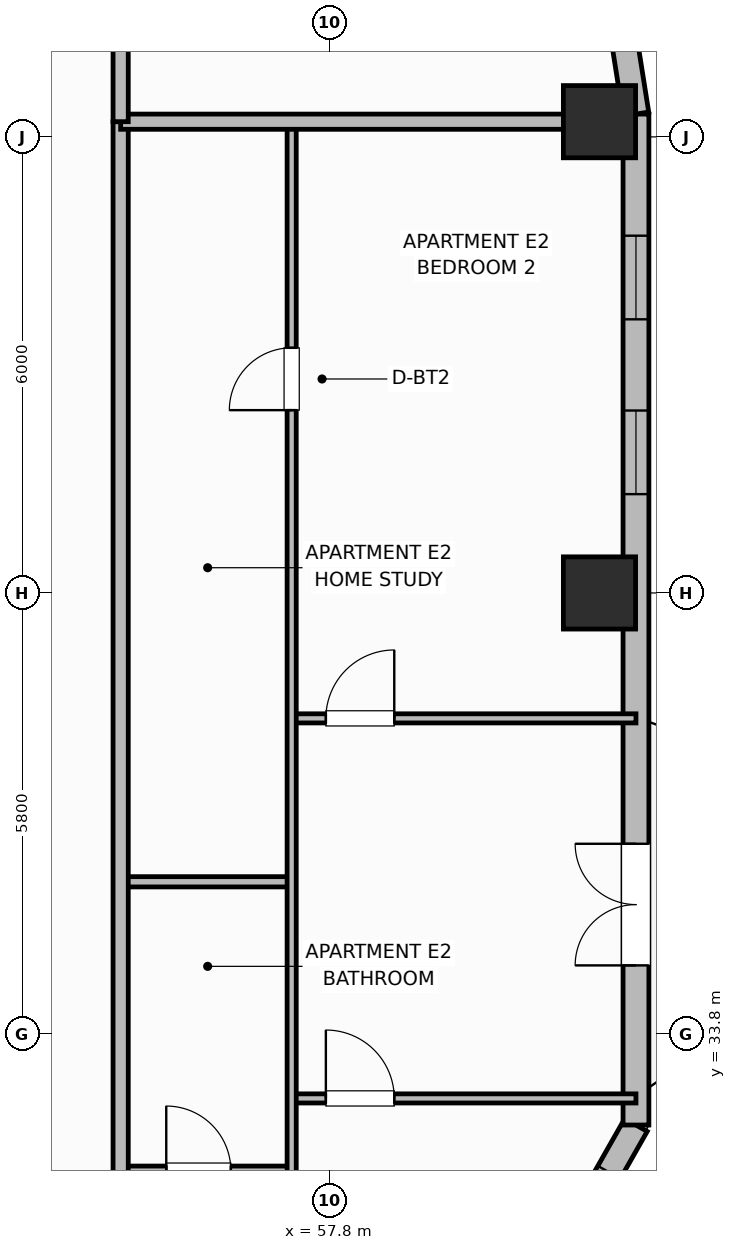
"""IFC4 building model, lengths in metres.
Left out: names, types, materials, properties, quantities, classifications, styles, units other than length and angle.
Written with IfcOpenShell. Run it as: python <this file> out.ifc"""

import sys

from ifc_helpers import new_model, si_unit, direction, frame, frame_2d, origin, origin_2d, place, context, subcontext, project, spatial, rectangle, extrude, element, fill, save


model = new_model("IFC4")
c1 = context("Model", 3, precision=1e-05, world=origin(), true_north=direction((0.0, 1.0)))
c2 = subcontext(c1, "Body", "Model", "MODEL_VIEW")
j1 = project(units=[si_unit("LENGTHUNIT", "METRE"), si_unit("PLANEANGLEUNIT", "RADIAN")], contexts=[c1])
p1 = place(None, origin())
s1 = spatial("IfcSite", under=j1, at=p1, CompositionType="ELEMENT")
p2 = place(p1, origin())
s2 = spatial("IfcBuilding", under=s1, at=p2, CompositionType="ELEMENT")
p3 = place(p2, frame((0.0, 0.0, 166.3)))
s3 = spatial("IfcBuildingStorey", under=s2, at=p3, CompositionType="ELEMENT", Elevation=166.3)
for number, where, z_axis, x_axis in (
    (1, (61.35, 39.6, 0.0), (0.0, 0.0, 1.0), (1.0, 0.0, 0.0)),
    (2, (61.35, 45.8, 0.0), (0.0, 0.0, 1.0), (1.0, 0.0, 0.0)),
):
    element("IfcColumn", number, at=place(p3, frame(where, z_axis=z_axis, x_axis=x_axis)), inside=s3, PredefinedType="COLUMN", context=c2, shape_type="SweptSolid", body=[
        extrude(rectangle(XDim=0.95, YDim=0.95, at=origin_2d()), origin(), (0.0, 0.0, 1.0), 3.7),
    ])
p4 = place(p3, frame((60.58, 30.4, 0.0), z_axis=(0.0, 0.0, 1.0), x_axis=(0.493976255291, 0.869475393101, 0.0)))
e3 = element("IfcWall", 3, at=p4, inside=s3, PredefinedType="SOLIDWALL", context=c2, shape_type="SweptSolid", body=[
    extrude(rectangle(XDim=2.531, YDim=0.34, at=frame_2d((1.265, 0.0))), origin(), (0.0, 0.0, 1.0), 2.72),
])
p5 = place(p4, frame((0.715, 0.0, 0.91)))
e4 = element("IfcOpeningElement", 4, at=p5, cuts=e3, PredefinedType="OPENING", context=c2, shape_type="SweptSolid", body=[
    extrude(rectangle(XDim=1.1, YDim=1.65, at=frame_2d((0.55, 0.825))), frame((0.0, 0.18, 0.0), z_axis=(0.0, -1.0, 0.0), x_axis=(1.0, 0.0, 0.0)), (0.0, 0.0, 1.0), 0.36),
])
p6 = place(p3, frame((61.83, 32.6, 0.0), z_axis=(0.0, 0.0, 1.0), x_axis=(0.0, 1.0, 0.0)))
e5 = element("IfcWall", 5, at=p6, inside=s3, PredefinedType="SOLIDWALL", context=c2, shape_type="SweptSolid", body=[
    extrude(rectangle(XDim=13.3, YDim=0.34, at=frame_2d((6.65, 0.0))), origin(), (0.0, 0.0, 1.0), 2.72),
])
p7 = place(p6, frame((2.1, 0.0, 0.0)))
e6 = element("IfcOpeningElement", 6, at=p7, cuts=e5, PredefinedType="OPENING", context=c2, shape_type="SweptSolid", body=[
    extrude(rectangle(XDim=1.6, YDim=2.1, at=frame_2d((0.8, 1.05))), frame((0.0, 0.18, 0.0), z_axis=(0.0, -1.0, 0.0), x_axis=(1.0, 0.0, 0.0)), (0.0, 0.0, 1.0), 0.36),
])
p8 = place(p6, frame((8.3, 0.0, 0.95)))
e7 = element("IfcOpeningElement", 7, at=p8, cuts=e5, PredefinedType="OPENING", context=c2, shape_type="SweptSolid", body=[
    extrude(rectangle(XDim=1.1, YDim=1.65, at=frame_2d((0.55, 0.825))), frame((0.0, 0.18, 0.0), z_axis=(0.0, -1.0, 0.0), x_axis=(1.0, 0.0, 0.0)), (0.0, 0.0, 1.0), 0.36),
])
p9 = place(p6, frame((10.6, 0.0, 0.95)))
e8 = element("IfcOpeningElement", 8, at=p9, cuts=e5, PredefinedType="OPENING", context=c2, shape_type="SweptSolid", body=[
    extrude(rectangle(XDim=1.1, YDim=1.65, at=frame_2d((0.55, 0.825))), frame((0.0, 0.18, 0.0), z_axis=(0.0, -1.0, 0.0), x_axis=(1.0, 0.0, 0.0)), (0.0, 0.0, 1.0), 0.36),
])
p10 = place(p3, frame((61.83, 45.9, 0.0), z_axis=(0.0, 0.0, 1.0), x_axis=(-0.156481329164, 0.987680916907, 0.0)))
e9 = element("IfcWall", 9, at=p10, inside=s3, PredefinedType="SOLIDWALL", context=c2, shape_type="SweptSolid", body=[
    extrude(rectangle(XDim=1.136, YDim=0.34, at=frame_2d((0.568, 0.0))), origin(), (0.0, 0.0, 1.0), 2.72),
])
p11 = place(p3, frame((55.05, 32.0, 0.0), z_axis=(0.0, 0.0, 1.0), x_axis=(1.0, 0.0, 0.0)))
e10 = element("IfcWall", 10, at=p11, inside=s3, PredefinedType="PARTITIONING", context=c2, shape_type="SweptSolid", body=[
    extrude(rectangle(XDim=2.25, YDim=0.12, at=frame_2d((1.125, 0.0))), origin(), (0.0, 0.0, 1.0), 2.55),
])
p12 = place(p11, frame((0.6, 0.0, 0.0)))
e11 = element("IfcOpeningElement", 11, at=p12, cuts=e10, PredefinedType="OPENING", context=c2, shape_type="SweptSolid", body=[
    extrude(rectangle(XDim=0.85, YDim=2.1, at=frame_2d((0.425, 1.05))), frame((0.0, 0.07, 0.0), z_axis=(0.0, -1.0, 0.0), x_axis=(1.0, 0.0, 0.0)), (0.0, 0.0, 1.0), 0.14),
])
p13 = place(p3, frame((55.05, 35.8, 0.0), z_axis=(0.0, 0.0, 1.0), x_axis=(1.0, 0.0, 0.0)))
e12 = element("IfcWall", 12, at=p13, inside=s3, PredefinedType="PARTITIONING", context=c2, shape_type="SweptSolid", body=[
    extrude(rectangle(XDim=2.25, YDim=0.135, at=frame_2d((1.125, 0.0))), origin(), (0.0, 0.0, 1.0), 2.55),
])
p14 = place(p3, frame((57.3, 32.95, 0.0), z_axis=(0.0, 0.0, 1.0), x_axis=(1.0, 0.0, 0.0)))
e13 = element("IfcWall", 13, at=p14, inside=s3, PredefinedType="PARTITIONING", context=c2, shape_type="SweptSolid", body=[
    extrude(rectangle(XDim=4.53, YDim=0.12, at=frame_2d((2.265, 0.0))), origin(), (0.0, 0.0, 1.0), 2.55),
])
p15 = place(p14, frame((0.45, 0.0, 0.0)))
e14 = element("IfcOpeningElement", 14, at=p15, cuts=e13, PredefinedType="OPENING", context=c2, shape_type="SweptSolid", body=[
    extrude(rectangle(XDim=0.9, YDim=2.1, at=frame_2d((0.45, 1.05))), frame((0.0, 0.07, 0.0), z_axis=(0.0, -1.0, 0.0), x_axis=(1.0, 0.0, 0.0)), (0.0, 0.0, 1.0), 0.14),
])
p16 = place(p3, frame((57.3, 37.95, 0.0), z_axis=(0.0, 0.0, 1.0), x_axis=(1.0, 0.0, 0.0)))
e15 = element("IfcWall", 15, at=p16, inside=s3, PredefinedType="PARTITIONING", context=c2, shape_type="SweptSolid", body=[
    extrude(rectangle(XDim=4.53, YDim=0.12, at=frame_2d((2.265, 0.0))), origin(), (0.0, 0.0, 1.0), 2.55),
])
p17 = place(p16, frame((0.45, 0.0, 0.0)))
e16 = element("IfcOpeningElement", 16, at=p17, cuts=e15, PredefinedType="OPENING", context=c2, shape_type="SweptSolid", body=[
    extrude(rectangle(XDim=0.9, YDim=2.1, at=frame_2d((0.45, 1.05))), frame((0.0, 0.07, 0.0), z_axis=(0.0, -1.0, 0.0), x_axis=(1.0, 0.0, 0.0)), (0.0, 0.0, 1.0), 0.14),
])
p18 = place(p3, frame((57.3, 26.64, 0.0), z_axis=(0.0, 0.0, 1.0), x_axis=(0.0, 1.0, 0.0)))
e17 = element("IfcWall", 17, at=p18, inside=s3, PredefinedType="PARTITIONING", context=c2, shape_type="SweptSolid", body=[
    extrude(rectangle(XDim=19.12, YDim=0.12, at=frame_2d((9.56, 0.0))), origin(), (0.0, 0.0, 1.0), 2.55),
])
p19 = place(p18, frame((2.81, 0.0, 0.0)))
e18 = element("IfcOpeningElement", 18, at=p19, cuts=e17, PredefinedType="OPENING", context=c2, shape_type="SweptSolid", body=[
    extrude(rectangle(XDim=0.9, YDim=2.1, at=frame_2d((0.45, 1.05))), frame((0.0, 0.07, 0.0), z_axis=(0.0, -1.0, 0.0), x_axis=(1.0, 0.0, 0.0)), (0.0, 0.0, 1.0), 0.14),
])
p20 = place(p18, frame((15.365, 0.0, 0.0)))
e19 = element("IfcOpeningElement", 19, at=p20, cuts=e17, PredefinedType="OPENING", context=c2, shape_type="SweptSolid", body=[
    extrude(rectangle(XDim=0.82, YDim=2.08, at=frame_2d((0.41, 1.04))), frame((0.0, 0.07, 0.0), z_axis=(0.0, -1.0, 0.0), x_axis=(1.0, 0.0, 0.0)), (0.0, 0.0, 1.0), 0.14),
])
p21 = place(p3, frame((55.05, 10.6, 0.0), z_axis=(0.0, 0.0, 1.0), x_axis=(0.0, 1.0, 0.0)))
e20 = element("IfcWall", 20, at=p21, inside=s3, PredefinedType="PARTITIONING", context=c2, shape_type="SweptSolid", body=[
    extrude(rectangle(XDim=35.2, YDim=0.2, at=frame_2d((17.6, 0.0))), origin(), (0.0, 0.0, 1.0), 2.55),
])
p22 = place(p21, frame((2.65, 0.0, 0.0)))
e21 = element("IfcOpeningElement", 21, at=p22, cuts=e20, PredefinedType="OPENING", context=c2, shape_type="SweptSolid", body=[
    extrude(rectangle(XDim=1.0, YDim=2.15, at=frame_2d((0.5, 1.075))), frame((0.0, 0.11, 0.0), z_axis=(0.0, -1.0, 0.0), x_axis=(1.0, 0.0, 0.0)), (0.0, 0.0, 1.0), 0.22),
])
p23 = place(p21, frame((19.95, 0.0, 0.0)))
e22 = element("IfcOpeningElement", 22, at=p23, cuts=e20, PredefinedType="OPENING", context=c2, shape_type="SweptSolid", body=[
    extrude(rectangle(XDim=1.0, YDim=2.15, at=frame_2d((0.5, 1.075))), frame((0.0, 0.11, 0.0), z_axis=(0.0, -1.0, 0.0), x_axis=(1.0, 0.0, 0.0)), (0.0, 0.0, 1.0), 0.22),
])
p24 = place(p3, frame((55.05, 45.8, 0.0), z_axis=(0.0, 0.0, 1.0), x_axis=(1.0, 0.0, 0.0)))
e23 = element("IfcWall", 23, at=p24, inside=s3, PredefinedType="PARTITIONING", context=c2, shape_type="SweptSolid", body=[
    extrude(rectangle(XDim=6.36, YDim=0.2, at=frame_2d((3.18, 0.0))), origin(), (0.0, 0.0, 1.0), 2.55),
])
p25 = place(p3, frame((55.05, 45.8, 0.0), z_axis=(0.0, 0.0, 1.0), x_axis=(0.0, 1.0, 0.0)))
e24 = element("IfcWall", 24, at=p25, inside=s3, PredefinedType="PARTITIONING", context=c2, shape_type="SweptSolid", body=[
    extrude(rectangle(XDim=3.73, YDim=0.2, at=frame_2d((1.865, 0.0))), origin(), (0.0, 0.0, 1.0), 2.55),
])
p26 = place(p7, origin())
e25 = element("IfcDoor", 25, at=p26, inside=s3, OperationType="DOUBLE_DOOR_SINGLE_SWING", PredefinedType="DOOR", context=c2, shape_type="SweptSolid", body=[
    extrude(rectangle(XDim=1.6, YDim=2.1, at=frame_2d((0.8, 1.05))), frame((0.0, 0.025, 0.0), z_axis=(0.0, -1.0, 0.0), x_axis=(1.0, 0.0, 0.0)), (0.0, 0.0, 1.0), 0.05),
])
fill(e6, e25)
p27 = place(p8, origin())
e26 = element("IfcWindow", 26, at=p27, inside=s3, PartitioningType="SINGLE_PANEL", PredefinedType="WINDOW", context=c2, shape_type="SweptSolid", body=[
    extrude(rectangle(XDim=1.1, YDim=1.65, at=frame_2d((0.55, 0.825))), frame((0.0, 0.03, 0.0), z_axis=(0.0, -1.0, 0.0), x_axis=(1.0, 0.0, 0.0)), (0.0, 0.0, 1.0), 0.06),
])
fill(e7, e26)
p28 = place(p9, origin())
e27 = element("IfcWindow", 27, at=p28, inside=s3, PartitioningType="SINGLE_PANEL", PredefinedType="WINDOW", context=c2, shape_type="SweptSolid", body=[
    extrude(rectangle(XDim=1.1, YDim=1.65, at=frame_2d((0.55, 0.825))), frame((0.0, 0.03, 0.0), z_axis=(0.0, -1.0, 0.0), x_axis=(1.0, 0.0, 0.0)), (0.0, 0.0, 1.0), 0.06),
])
fill(e8, e27)
p29 = place(p12, origin())
e28 = element("IfcDoor", 28, at=p29, inside=s3, OperationType="SINGLE_SWING_LEFT", PredefinedType="DOOR", context=c2, shape_type="SweptSolid", body=[
    extrude(rectangle(XDim=0.85, YDim=2.1, at=frame_2d((0.425, 1.05))), frame((0.0, 0.025, 0.0), z_axis=(0.0, -1.0, 0.0), x_axis=(1.0, 0.0, 0.0)), (0.0, 0.0, 1.0), 0.05),
])
fill(e11, e28)
p30 = place(p15, origin())
e29 = element("IfcDoor", 29, at=p30, inside=s3, OperationType="SINGLE_SWING_LEFT", PredefinedType="DOOR", context=c2, shape_type="SweptSolid", body=[
    extrude(rectangle(XDim=0.9, YDim=2.1, at=frame_2d((0.45, 1.05))), frame((0.0, 0.025, 0.0), z_axis=(0.0, -1.0, 0.0), x_axis=(1.0, 0.0, 0.0)), (0.0, 0.0, 1.0), 0.05),
])
fill(e14, e29)
p31 = place(p17, origin())
e30 = element("IfcDoor", 30, at=p31, inside=s3, OperationType="SINGLE_SWING_RIGHT", PredefinedType="DOOR", context=c2, shape_type="SweptSolid", body=[
    extrude(rectangle(XDim=0.9, YDim=2.1, at=frame_2d((0.45, 1.05))), frame((0.0, 0.025, 0.0), z_axis=(0.0, -1.0, 0.0), x_axis=(1.0, 0.0, 0.0)), (0.0, 0.0, 1.0), 0.05),
])
fill(e16, e30)
p32 = place(p20, origin())
e31 = element("IfcDoor", 31, at=p32, inside=s3, OperationType="SINGLE_SWING_LEFT", PredefinedType="DOOR", context=c2, shape_type="SweptSolid", body=[
    extrude(rectangle(XDim=0.82, YDim=2.08, at=frame_2d((0.41, 1.04))), frame((0.0, 0.025, 0.0), z_axis=(0.0, -1.0, 0.0), x_axis=(1.0, 0.0, 0.0)), (0.0, 0.0, 1.0), 0.05),
])
fill(e19, e31)
save(model, sys.argv[1])
